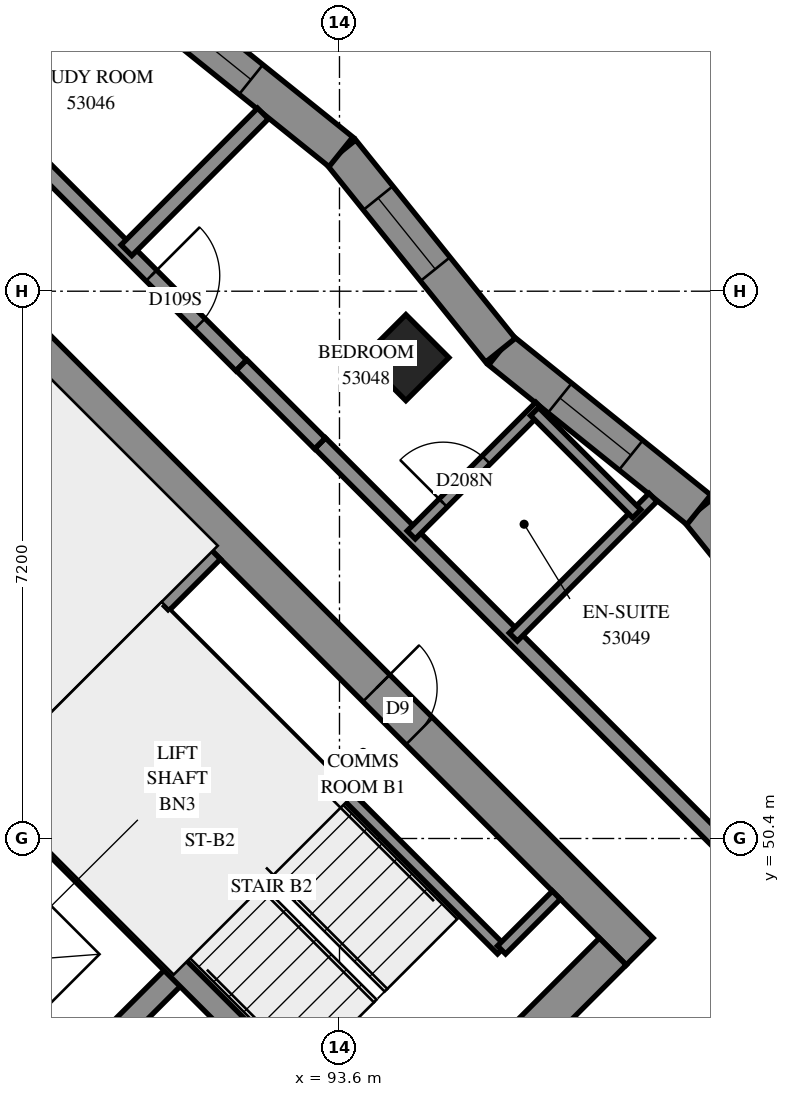
"""IFC4 building model, lengths in metres.
Left out: names, types, materials, properties, quantities, classifications, styles, units other than length and angle.
Written with IfcOpenShell. Run it as: python <this file> out.ifc"""

import sys

from ifc_helpers import new_model, si_unit, direction, frame, frame_2d, origin, origin_2d, place, context, subcontext, project, spatial, polyline, rectangle, outline, extrude, element, fill, save


model = new_model("IFC4")
c1 = context("Model", 3, precision=1e-05, world=origin(), true_north=direction((0.0, 1.0)))
c2 = subcontext(c1, "Body", "Model", "MODEL_VIEW")
j1 = project(units=[si_unit("LENGTHUNIT", "METRE"), si_unit("PLANEANGLEUNIT", "RADIAN")], contexts=[c1])
p1 = place(None, origin())
s1 = spatial("IfcSite", under=j1, at=p1, CompositionType="ELEMENT")
p2 = place(p1, origin())
s2 = spatial("IfcBuilding", under=s1, at=p2, CompositionType="ELEMENT")
p3 = place(p2, frame((0.0, 0.0, 196.4)))
s3 = spatial("IfcBuildingStorey", under=s2, at=p3, CompositionType="ELEMENT", Elevation=196.4)
p4 = place(p3, frame((94.474, 56.727, 0.0), z_axis=(0.0, 0.0, 1.0), x_axis=(0.7071067812, -0.7071067812, 0.0)))
e1 = element("IfcColumn", 1, at=p4, inside=s3, PredefinedType="COLUMN", context=c2, shape_type="SweptSolid", body=[
    extrude(rectangle(XDim=0.8, YDim=0.8, at=origin_2d()), origin(), (0.0, 0.0, 1.0), 3.1),
])
p5 = place(p3, frame((86.66, 59.802, -0.3), z_axis=(0.0, 0.0, 1.0), x_axis=(0.7071067812, -0.7071067812, 0.0)))
e2 = element("IfcWall", 2, at=p5, inside=s3, PredefinedType="SHEAR", context=c2, shape_type="SweptSolid", body=[
    extrude(rectangle(XDim=15.4, YDim=0.5, at=frame_2d((7.7, 0.0))), origin(), (0.0, 0.0, 1.0), 2.7),
])
p6 = place(p5, frame((10.5, 0.0, 0.3)))
e3 = element("IfcOpeningElement", 3, at=p6, cuts=e2, PredefinedType="OPENING", context=c2, shape_type="SweptSolid", body=[
    extrude(rectangle(XDim=0.8, YDim=2.1, at=frame_2d((0.4, 1.05))), frame((0.0, 0.26, 0.0), z_axis=(0.0, -1.0, 0.0), x_axis=(1.0, 0.0, 0.0)), (0.0, 0.0, 1.0), 0.52),
])
p7 = place(p3, frame((87.013, 38.731, -0.3), z_axis=(0.0, 0.0, 1.0), x_axis=(0.7071067812, 0.7071067812, 0.0)))
e4 = element("IfcWall", 4, at=p7, inside=s3, PredefinedType="SHEAR", context=c2, shape_type="SweptSolid", body=[
    extrude(rectangle(XDim=14.4, YDim=0.5, at=frame_2d((7.2, 0.0))), origin(), (0.0, 0.0, 1.0), 2.7),
])
p8 = place(p7, frame((4.55, 0.0, 0.3)))
e5 = element("IfcOpeningElement", 5, at=p8, cuts=e4, PredefinedType="OPENING", context=c2, shape_type="SweptSolid", body=[
    extrude(rectangle(XDim=1.1, YDim=2.1, at=frame_2d((0.55, 1.05))), frame((0.0, 0.26, 0.0), z_axis=(0.0, -1.0, 0.0), x_axis=(1.0, 0.0, 0.0)), (0.0, 0.0, 1.0), 0.52),
])
p9 = place(p7, frame((11.35, 0.0, 0.3)))
e6 = element("IfcOpeningElement", 6, at=p9, cuts=e4, PredefinedType="OPENING", context=c2, shape_type="SweptSolid", body=[
    extrude(rectangle(XDim=1.1, YDim=2.1, at=frame_2d((0.55, 1.05))), frame((0.0, 0.26, 0.0), z_axis=(0.0, -1.0, 0.0), x_axis=(1.0, 0.0, 0.0)), (0.0, 0.0, 1.0), 0.52),
])
p10 = place(p3, frame((89.17, 46.332, 0.0), z_axis=(0.0, 0.0, 1.0), x_axis=(0.7071067812, 0.7071067812, 0.0)))
e7 = element("IfcWall", 7, at=p10, inside=s3, PredefinedType="SOLIDWALL", context=c2, shape_type="SweptSolid", body=[
    extrude(rectangle(XDim=3.3, YDim=0.3, at=frame_2d((1.65, 0.0))), origin(), (0.0, 0.0, 1.0), 3.1),
])
p11 = place(p3, frame((81.534, 53.969, 0.0), z_axis=(0.0, 0.0, 1.0), x_axis=(0.707103309, -0.7071102534, 0.0)))
e8 = element("IfcWall", 8, at=p11, inside=s3, PredefinedType="SOLIDWALL", context=c2, shape_type="SweptSolid", body=[
    extrude(rectangle(XDim=14.4, YDim=0.3, at=frame_2d((7.2, 0.0))), origin(), (0.0, 0.0, 1.0), 3.1),
])
p12 = place(p11, frame((1.25, 0.0, 0.0)))
e9 = element("IfcOpeningElement", 9, at=p12, cuts=e8, PredefinedType="OPENING", context=c2, shape_type="SweptSolid", body=[
    extrude(rectangle(XDim=1.1, YDim=2.1, at=frame_2d((0.55, 1.05))), frame((0.0, 0.16, 0.0), z_axis=(0.0, -1.0, 0.0), x_axis=(1.0, 0.0, 0.0)), (0.0, 0.0, 1.0), 0.32),
])
p13 = place(p11, frame((4.85, 0.0, 0.0)))
e10 = element("IfcOpeningElement", 10, at=p13, cuts=e8, PredefinedType="OPENING", context=c2, shape_type="SweptSolid", body=[
    extrude(rectangle(XDim=1.1, YDim=2.1, at=frame_2d((0.55, 1.05))), frame((0.0, 0.16, 0.0), z_axis=(0.0, -1.0, 0.0), x_axis=(1.0, 0.0, 0.0)), (0.0, 0.0, 1.0), 0.32),
])
p14 = place(p11, frame((8.45, 0.0, 0.0)))
e11 = element("IfcOpeningElement", 11, at=p14, cuts=e8, PredefinedType="OPENING", context=c2, shape_type="SweptSolid", body=[
    extrude(rectangle(XDim=1.1, YDim=2.1, at=frame_2d((0.55, 1.05))), frame((0.0, 0.16, 0.0), z_axis=(0.0, -1.0, 0.0), x_axis=(1.0, 0.0, 0.0)), (0.0, 0.0, 1.0), 0.32),
])
p15 = place(p11, frame((12.05, 0.0, 0.0)))
e12 = element("IfcOpeningElement", 12, at=p15, cuts=e8, PredefinedType="OPENING", context=c2, shape_type="SweptSolid", body=[
    extrude(rectangle(XDim=1.1, YDim=2.1, at=frame_2d((0.55, 1.05))), frame((0.0, 0.16, 0.0), z_axis=(0.0, -1.0, 0.0), x_axis=(1.0, 0.0, 0.0)), (0.0, 0.0, 1.0), 0.32),
])
p16 = place(p3, frame((88.958, 51.211, 0.0), z_axis=(0.0, 0.0, 1.0), x_axis=(0.7070998367, -0.7071137256, 0.0)))
e13 = element("IfcWall", 13, at=p16, inside=s3, PredefinedType="SOLIDWALL", context=c2, shape_type="SweptSolid", body=[
    extrude(rectangle(XDim=7.2, YDim=0.3, at=frame_2d((3.6, 0.0))), origin(), (0.0, 0.0, 1.0), 3.1),
])
p17 = place(p3, frame((88.958, 51.211, 0.0), z_axis=(0.0, 0.0, 1.0), x_axis=(0.7071067812, 0.7071067812, 0.0)))
e14 = element("IfcWall", 14, at=p17, inside=s3, PredefinedType="SOLIDWALL", context=c2, shape_type="SweptSolid", body=[
    extrude(rectangle(XDim=4.2, YDim=0.3, at=frame_2d((2.1, 0.0))), origin(), (0.0, 0.0, 1.0), 3.1),
])
p18 = place(p3, frame((100.441, 52.098, 0.0), z_axis=(0.0, 0.0, 1.0), x_axis=(-0.6267656926, 0.7792077814, 0.0)))
e15 = element("IfcWall", 15, at=p18, inside=s3, PredefinedType="SOLIDWALL", context=c2, shape_type="SweptSolid", body=[
    extrude(outline(polyline([(0.049, -0.25), (3.398, -0.25), (3.344, 0.25), (-0.049, 0.25), (0.049, -0.25)])), origin(), (0.0, 0.0, 1.0), 3.1),
])
p19 = place(p18, frame((1.072, 0.0, 0.45)))
e16 = element("IfcOpeningElement", 16, at=p19, cuts=e15, PredefinedType="OPENING", context=c2, shape_type="SweptSolid", body=[
    extrude(rectangle(XDim=1.2, YDim=2.5, at=frame_2d((0.6, 1.25))), frame((0.0, 0.26, 0.0), z_axis=(0.0, -1.0, 0.0), x_axis=(1.0, 0.0, 0.0)), (0.0, 0.0, 1.0), 0.52),
])
p20 = place(p3, frame((98.328, 54.724, 0.0), z_axis=(0.0, 0.0, 1.0), x_axis=(-0.7792172545, 0.6267539152, 0.0)))
e17 = element("IfcWall", 17, at=p20, inside=s3, PredefinedType="SOLIDWALL", context=c2, shape_type="SweptSolid", body=[
    extrude(outline(polyline([(-0.027, -0.25), (3.322, -0.25), (3.376, 0.25), (0.027, 0.25), (-0.027, -0.25)])), origin(), (0.0, 0.0, 1.0), 3.1),
])
p21 = place(p20, frame((1.147, 0.0, 0.45)))
e18 = element("IfcOpeningElement", 18, at=p21, cuts=e17, PredefinedType="OPENING", context=c2, shape_type="SweptSolid", body=[
    extrude(rectangle(XDim=1.2, YDim=2.5, at=frame_2d((0.6, 1.25))), frame((0.0, 0.26, 0.0), z_axis=(0.0, -1.0, 0.0), x_axis=(1.0, 0.0, 0.0)), (0.0, 0.0, 1.0), 0.52),
])
p22 = place(p3, frame((95.718, 56.823, 0.0), z_axis=(0.0, 0.0, 1.0), x_axis=(-0.6267539152, 0.7792172545, 0.0)))
e19 = element("IfcWall", 19, at=p22, inside=s3, PredefinedType="SOLIDWALL", context=c2, shape_type="SweptSolid", body=[
    extrude(outline(polyline([(0.027, -0.25), (3.376, -0.25), (3.322, 0.25), (-0.027, 0.25), (0.027, -0.25)])), origin(), (0.0, 0.0, 1.0), 3.1),
])
p23 = place(p22, frame((1.369, 0.0, 0.45)))
e20 = element("IfcOpeningElement", 20, at=p23, cuts=e19, PredefinedType="OPENING", context=c2, shape_type="SweptSolid", body=[
    extrude(rectangle(XDim=1.2, YDim=2.5, at=frame_2d((0.6, 1.25))), frame((0.0, 0.26, 0.0), z_axis=(0.0, -1.0, 0.0), x_axis=(1.0, 0.0, 0.0)), (0.0, 0.0, 1.0), 0.52),
])
p24 = place(p3, frame((93.619, 59.433, 0.0), z_axis=(0.0, 0.0, 1.0), x_axis=(-0.7792026718, 0.6267720449, 0.0)))
e21 = element("IfcWall", 21, at=p24, inside=s3, PredefinedType="SOLIDWALL", context=c2, shape_type="SweptSolid", body=[
    extrude(outline(polyline([(-0.027, -0.25), (3.322, -0.25), (3.376, 0.25), (0.027, 0.25), (-0.027, -0.25)])), origin(), (0.0, 0.0, 1.0), 3.1),
])
p25 = place(p24, frame((1.519, 0.0, 0.45)))
e22 = element("IfcOpeningElement", 22, at=p25, cuts=e21, PredefinedType="OPENING", context=c2, shape_type="SweptSolid", body=[
    extrude(rectangle(XDim=1.2, YDim=2.5, at=frame_2d((0.6, 1.25))), frame((0.0, 0.26, 0.0), z_axis=(0.0, -1.0, 0.0), x_axis=(1.0, 0.0, 0.0)), (0.0, 0.0, 1.0), 0.52),
])
p26 = place(p3, frame((91.313, 53.354, 0.0), z_axis=(0.0, 0.0, 1.0), x_axis=(0.7071147811, -0.7070987812, 0.0)))
e23 = element("IfcWall", 23, at=p26, inside=s3, PredefinedType="PARTITIONING", context=c2, shape_type="SweptSolid", body=[
    extrude(rectangle(XDim=6.25, YDim=0.15, at=frame_2d((3.125, 0.0))), origin(), (0.0, 0.0, 1.0), 3.1),
])
p27 = place(p3, frame((95.732, 48.934, 0.0), z_axis=(0.0, 0.0, 1.0), x_axis=(0.7071067812, 0.7071067812, 0.0)))
e24 = element("IfcWall", 24, at=p27, inside=s3, PredefinedType="PARTITIONING", context=c2, shape_type="SweptSolid", body=[
    extrude(rectangle(XDim=1.02, YDim=0.15, at=frame_2d((0.51, 0.0))), origin(), (0.0, 0.0, 1.0), 3.1),
])
p28 = place(p3, frame((93.346, 55.599, 0.0), z_axis=(0.0, 0.0, 1.0), x_axis=(0.7071067812, -0.7071067812, 0.0)))
e25 = element("IfcWall", 25, at=p28, inside=s3, PredefinedType="PARTITIONING", context=c2, shape_type="SweptSolid", body=[
    extrude(rectangle(XDim=9.201, YDim=0.2, at=frame_2d((4.601, 0.0))), origin(), (0.0, 0.0, 1.0), 3.1),
])
p29 = place(p3, frame((94.049, 43.293, 0.0), z_axis=(0.0, 0.0, 1.0), x_axis=(0.7071067812, 0.7071067812, 0.0)))
e26 = element("IfcWall", 26, at=p29, inside=s3, PredefinedType="PARTITIONING", context=c2, shape_type="SweptSolid", body=[
    extrude(rectangle(XDim=8.2, YDim=0.2, at=frame_2d((4.1, 0.0))), origin(), (0.0, 0.0, 1.0), 3.1),
])
p30 = place(p29, frame((0.252, 0.0, 0.0)))
e27 = element("IfcOpeningElement", 27, at=p30, cuts=e26, PredefinedType="OPENING", context=c2, shape_type="SweptSolid", body=[
    extrude(rectangle(XDim=1.0, YDim=2.1, at=frame_2d((0.5, 1.05))), frame((0.0, 0.11, 0.0), z_axis=(0.0, -1.0, 0.0), x_axis=(1.0, 0.0, 0.0)), (0.0, 0.0, 1.0), 0.22),
])
p31 = place(p3, frame((88.247, 60.683, 0.0), z_axis=(0.0, 0.0, 1.0), x_axis=(0.7071067812, -0.7071067812, 0.0)))
e28 = element("IfcWall", 28, at=p31, inside=s3, PredefinedType="PARTITIONING", context=c2, shape_type="SweptSolid", body=[
    extrude(rectangle(XDim=5.742, YDim=0.2, at=frame_2d((2.871, 0.0))), origin(), (0.0, 0.0, 1.0), 3.1),
])
p32 = place(p31, frame((4.069, 0.0, 0.0)))
e29 = element("IfcOpeningElement", 29, at=p32, cuts=e28, PredefinedType="OPENING", context=c2, shape_type="SweptSolid", body=[
    extrude(rectangle(XDim=0.9, YDim=2.1, at=frame_2d((0.45, 1.05))), frame((0.0, 0.11, 0.0), z_axis=(0.0, -1.0, 0.0), x_axis=(1.0, 0.0, 0.0)), (0.0, 0.0, 1.0), 0.22),
])
p33 = place(p3, frame((95.887, 53.051, 0.0), z_axis=(0.0, 0.0, 1.0), x_axis=(0.7070875415, 0.7071260204, 0.0)))
e30 = element("IfcWall", 30, at=p33, inside=s3, PredefinedType="PARTITIONING", context=c2, shape_type="SweptSolid", body=[
    extrude(rectangle(XDim=2.599, YDim=0.15, at=frame_2d((1.299, 0.0))), origin(), (0.0, 0.0, 1.0), 3.1),
])
p34 = place(p3, frame((90.797, 58.139, 0.0), z_axis=(0.0, 0.0, 1.0), x_axis=(0.7066541826, 0.7075590903, 0.0)))
e31 = element("IfcWall", 31, at=p34, inside=s3, PredefinedType="PARTITIONING", context=c2, shape_type="SweptSolid", body=[
    extrude(rectangle(XDim=2.542, YDim=0.2, at=frame_2d((1.271, 0.0))), origin(), (0.0, 0.0, 1.0), 3.1),
])
p35 = place(p3, frame((94.544, 54.394, 0.0), z_axis=(0.0, 0.0, 1.0), x_axis=(0.7070858847, 0.7071276771, 0.0)))
e32 = element("IfcWall", 32, at=p35, inside=s3, PredefinedType="PARTITIONING", context=c2, shape_type="SweptSolid", body=[
    extrude(rectangle(XDim=2.393, YDim=0.15, at=frame_2d((1.196, 0.0))), origin(), (0.0, 0.0, 1.0), 3.1),
])
p36 = place(p35, frame((0.594, 0.0, 0.0)))
e33 = element("IfcOpeningElement", 33, at=p36, cuts=e32, PredefinedType="OPENING", context=c2, shape_type="SweptSolid", body=[
    extrude(rectangle(XDim=0.8, YDim=2.1, at=frame_2d((0.4, 1.05))), frame((0.0, 0.085, 0.0), z_axis=(0.0, -1.0, 0.0), x_axis=(1.0, 0.0, 0.0)), (0.0, 0.0, 1.0), 0.17),
])
p37 = place(p3, frame((96.167, 56.017, 0.0), z_axis=(0.0, 0.0, 1.0), x_axis=(0.7071067812, -0.7071067812, 0.0)))
e34 = element("IfcWall", 34, at=p37, inside=s3, PredefinedType="PARTITIONING", context=c2, shape_type="SweptSolid", body=[
    extrude(rectangle(XDim=1.901, YDim=0.15, at=frame_2d((0.95, 0.0))), origin(), (0.0, 0.0, 1.0), 3.1),
])
p38 = place(p3, frame((92.311, 56.627, 0.0), z_axis=(0.0, 0.0, 1.0), x_axis=(0.7077922938, -0.7064206033, 0.0)))
e35 = element("IfcWall", 35, at=p38, inside=s3, PredefinedType="PARTITIONING", context=c2, shape_type="SweptSolid", body=[
    extrude(rectangle(XDim=1.458, YDim=0.2, at=frame_2d((0.729, 0.0))), origin(), (0.0, 0.0, 1.0), 3.1),
])
p39 = place(p21, origin())
e36 = element("IfcWindow", 36, at=p39, inside=s3, PartitioningType="SINGLE_PANEL", PredefinedType="WINDOW", context=c2, shape_type="SweptSolid", body=[
    extrude(rectangle(XDim=1.2, YDim=2.5, at=frame_2d((0.6, 1.25))), frame((0.0, 0.18, 0.0), z_axis=(0.0, -1.0, 0.0), x_axis=(1.0, 0.0, 0.0)), (0.0, 0.0, 1.0), 0.06),
])
fill(e18, e36)
p40 = place(p23, origin())
e37 = element("IfcWindow", 37, at=p40, inside=s3, PartitioningType="SINGLE_PANEL", PredefinedType="WINDOW", context=c2, shape_type="SweptSolid", body=[
    extrude(rectangle(XDim=1.2, YDim=2.5, at=frame_2d((0.6, 1.25))), frame((0.0, 0.18, 0.0), z_axis=(0.0, -1.0, 0.0), x_axis=(1.0, 0.0, 0.0)), (0.0, 0.0, 1.0), 0.06),
])
fill(e20, e37)
p41 = place(p25, origin())
e38 = element("IfcWindow", 38, at=p41, inside=s3, PartitioningType="SINGLE_PANEL", PredefinedType="WINDOW", context=c2, shape_type="SweptSolid", body=[
    extrude(rectangle(XDim=1.2, YDim=2.5, at=frame_2d((0.6, 1.25))), frame((0.0, 0.18, 0.0), z_axis=(0.0, -1.0, 0.0), x_axis=(1.0, 0.0, 0.0)), (0.0, 0.0, 1.0), 0.06),
])
fill(e22, e38)
p42 = place(p6, origin())
e39 = element("IfcDoor", 39, at=p42, inside=s3, OperationType="SINGLE_SWING_RIGHT", PredefinedType="DOOR", context=c2, shape_type="SweptSolid", body=[
    extrude(rectangle(XDim=0.8, YDim=2.1, at=frame_2d((0.4, 1.05))), frame((0.0, 0.025, 0.0), z_axis=(0.0, -1.0, 0.0), x_axis=(1.0, 0.0, 0.0)), (0.0, 0.0, 1.0), 0.05),
])
fill(e3, e39)
p43 = place(p32, origin())
e40 = element("IfcDoor", 40, at=p43, inside=s3, OperationType="SINGLE_SWING_RIGHT", PredefinedType="DOOR", context=c2, shape_type="SweptSolid", body=[
    extrude(rectangle(XDim=0.9, YDim=2.1, at=frame_2d((0.45, 1.05))), frame((0.0, 0.025, 0.0), z_axis=(0.0, -1.0, 0.0), x_axis=(1.0, 0.0, 0.0)), (0.0, 0.0, 1.0), 0.05),
])
fill(e29, e40)
p44 = place(p36, origin())
e41 = element("IfcDoor", 41, at=p44, inside=s3, OperationType="SINGLE_SWING_RIGHT", PredefinedType="DOOR", context=c2, shape_type="SweptSolid", body=[
    extrude(rectangle(XDim=0.8, YDim=2.1, at=frame_2d((0.4, 1.05))), frame((0.0, 0.025, 0.0), z_axis=(0.0, -1.0, 0.0), x_axis=(1.0, 0.0, 0.0)), (0.0, 0.0, 1.0), 0.05),
])
fill(e33, e41)
save(model, sys.argv[1])
